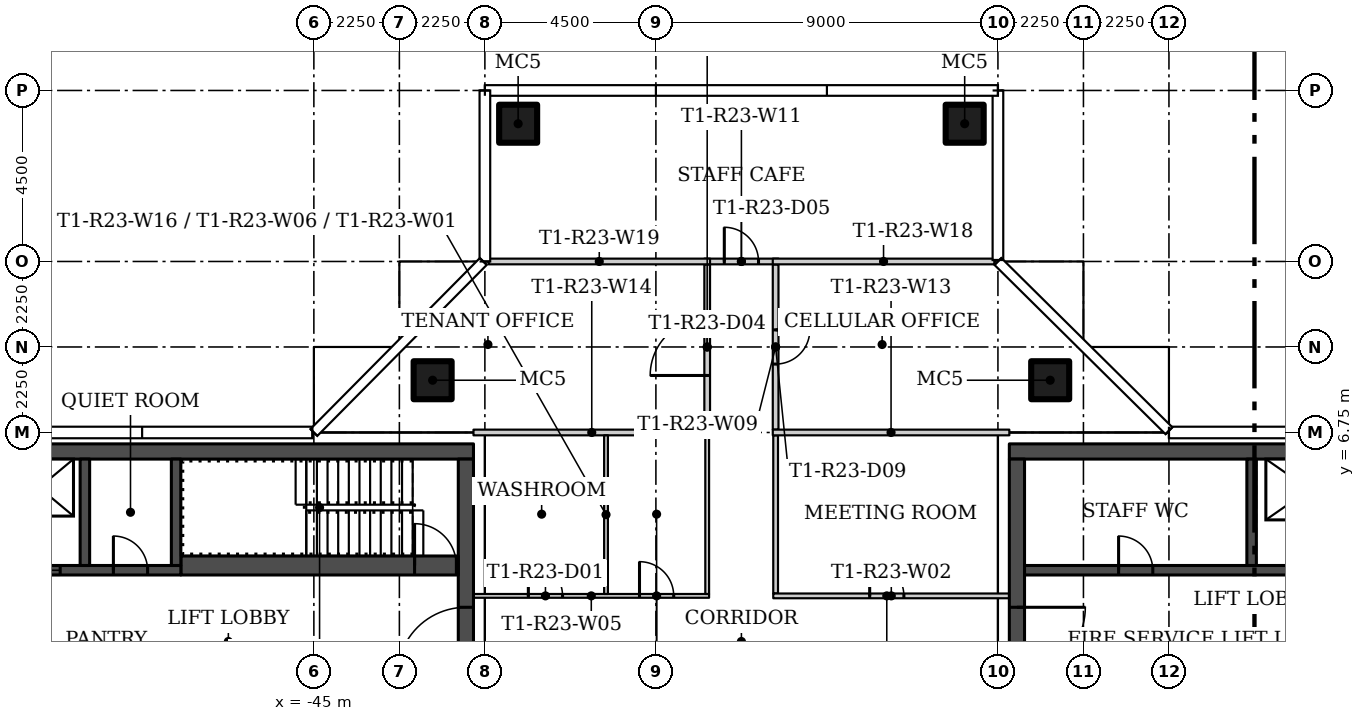
"""IFC4 building model, lengths in metres.
Left out: names, types, materials, properties, quantities, classifications, styles, units other than length and angle.
Written with IfcOpenShell. Run it as: python <this file> out.ifc"""

import sys

from ifc_helpers import new_model, si_unit, direction, frame, frame_2d, origin, origin_2d, place, context, subcontext, project, spatial, rectangle, hollow_rectangle, extrude, element, fill, save


model = new_model("IFC4")
c1 = context("Model", 3, precision=1e-05, world=origin(), true_north=direction((0.0, 1.0)))
c2 = subcontext(c1, "Body", "Model", "MODEL_VIEW")
j1 = project(units=[si_unit("LENGTHUNIT", "METRE"), si_unit("PLANEANGLEUNIT", "RADIAN")], contexts=[c1])
p1 = place(None, origin())
s1 = spatial("IfcSite", under=j1, at=p1, CompositionType="ELEMENT")
p2 = place(p1, origin())
s2 = spatial("IfcBuilding", under=s1, at=p2, CompositionType="ELEMENT")
p3 = place(p2, frame((0.0, 0.0, 210.0)))
s3 = spatial("IfcBuildingStorey", under=s2, at=p3, CompositionType="ELEMENT", Elevation=210.0)
for number, where in (
    (1, (-25.625, 8.125, 0.0)),
    (2, (-41.875, 8.125, 0.0)),
    (3, (-39.625, 14.875, 0.0)),
    (4, (-27.875, 14.875, 0.0)),
):
    element("IfcColumn", number, at=place(p3, frame(where)), inside=s3, PredefinedType="COLUMN", context=c2, shape_type="SweptSolid", body=[
        extrude(hollow_rectangle(XDim=1.0, YDim=1.0, WallThickness=0.04, at=origin_2d()), origin(), (0.0, 0.0, 1.0), 3.55),
    ])
p4 = place(p3, frame((-32.85, 6.675, 0.0), z_axis=(0.0, 0.0, 1.0), x_axis=(0.0, -1.0, 0.0)))
e5 = element("IfcWall", 5, at=p4, inside=s3, PredefinedType="PARTITIONING", context=c2, shape_type="SweptSolid", body=[
    extrude(rectangle(XDim=4.162, YDim=0.125, at=frame_2d((2.081, 0.0))), origin(), (0.0, 0.0, 1.0), 3.55),
])
p5 = place(p3, frame((-32.912, 2.45, 0.0)))
e6 = element("IfcWall", 6, at=p5, inside=s3, PredefinedType="PARTITIONING", context=c2, shape_type="SweptSolid", body=[
    extrude(rectangle(XDim=6.212, YDim=0.125, at=frame_2d((3.106, 0.0))), origin(), (0.0, 0.0, 1.0), 3.55),
])
p6 = place(p5, frame((2.537, 0.0, 0.0)))
e7 = element("IfcOpeningElement", 7, at=p6, cuts=e6, PredefinedType="OPENING", context=c2, shape_type="SweptSolid", body=[
    extrude(rectangle(XDim=0.9, YDim=2.1, at=frame_2d((0.45, 1.05))), frame((0.0, 0.073, 0.0), z_axis=(0.0, -1.0, 0.0), x_axis=(1.0, 0.0, 0.0)), (0.0, 0.0, 1.0), 0.145),
])
p7 = place(p3, frame((-40.8, 2.45, 0.0)))
e8 = element("IfcWall", 8, at=p7, inside=s3, PredefinedType="PARTITIONING", context=c2, shape_type="SweptSolid", body=[
    extrude(rectangle(XDim=6.2, YDim=0.1, at=frame_2d((3.1, 0.0))), origin(), (0.0, 0.0, 1.0), 3.55),
])
p8 = place(p7, frame((1.444, 0.0, 0.0)))
e9 = element("IfcOpeningElement", 9, at=p8, cuts=e8, PredefinedType="OPENING", context=c2, shape_type="SweptSolid", body=[
    extrude(rectangle(XDim=0.9, YDim=2.1, at=frame_2d((0.45, 1.05))), frame((0.0, 0.06, 0.0), z_axis=(0.0, -1.0, 0.0), x_axis=(1.0, 0.0, 0.0)), (0.0, 0.0, 1.0), 0.12),
])
p9 = place(p7, frame((4.368, 0.0, 0.0)))
e10 = element("IfcOpeningElement", 10, at=p9, cuts=e8, PredefinedType="OPENING", context=c2, shape_type="SweptSolid", body=[
    extrude(rectangle(XDim=0.9, YDim=2.1, at=frame_2d((0.45, 1.05))), frame((0.0, 0.06, 0.0), z_axis=(0.0, -1.0, 0.0), x_axis=(1.0, 0.0, 0.0)), (0.0, 0.0, 1.0), 0.12),
])
p10 = place(p3, frame((-34.65, 2.5, 0.0), z_axis=(0.0, 0.0, 1.0), x_axis=(0.0, 1.0, 0.0)))
e11 = element("IfcWall", 11, at=p10, inside=s3, PredefinedType="PARTITIONING", context=c2, shape_type="SweptSolid", body=[
    extrude(rectangle(XDim=4.175, YDim=0.1, at=frame_2d((2.087, 0.0))), origin(), (0.0, 0.0, 1.0), 3.55),
])
p11 = place(p3, frame((-32.85, 11.175, 0.0), z_axis=(0.0, 0.0, 1.0), x_axis=(0.0, -1.0, 0.0)))
e12 = element("IfcWall", 12, at=p11, inside=s3, PredefinedType="PARTITIONING", context=c2, shape_type="SweptSolid", body=[
    extrude(rectangle(XDim=4.35, YDim=0.15, at=frame_2d((2.175, 0.0))), origin(), (0.0, 0.0, 1.0), 3.55),
])
p12 = place(p11, frame((1.725, 0.0, 0.0)))
e13 = element("IfcOpeningElement", 13, at=p12, cuts=e12, PredefinedType="OPENING", context=c2, shape_type="SweptSolid", body=[
    extrude(rectangle(XDim=0.9, YDim=2.1, at=frame_2d((0.45, 1.05))), frame((0.0, 0.085, 0.0), z_axis=(0.0, -1.0, 0.0), x_axis=(1.0, 0.0, 0.0)), (0.0, 0.0, 1.0), 0.17),
])
p13 = place(p3, frame((-34.65, 6.825, 0.0), z_axis=(0.0, 0.0, 1.0), x_axis=(0.0, 1.0, 0.0)))
e14 = element("IfcWall", 14, at=p13, inside=s3, PredefinedType="PARTITIONING", context=c2, shape_type="SweptSolid", body=[
    extrude(rectangle(XDim=4.35, YDim=0.15, at=frame_2d((2.175, 0.0))), origin(), (0.0, 0.0, 1.0), 3.55),
])
p14 = place(p13, frame((1.425, 0.0, 0.0)))
e15 = element("IfcOpeningElement", 15, at=p14, cuts=e14, PredefinedType="OPENING", context=c2, shape_type="SweptSolid", body=[
    extrude(rectangle(XDim=1.5, YDim=2.1, at=frame_2d((0.75, 1.05))), frame((0.0, 0.085, 0.0), z_axis=(0.0, -1.0, 0.0), x_axis=(1.0, 0.0, 0.0)), (0.0, 0.0, 1.0), 0.17),
])
p15 = place(p3, frame((-34.725, 11.25, 0.0)))
e16 = element("IfcWall", 16, at=p15, inside=s3, PredefinedType="PARTITIONING", context=c2, shape_type="SweptSolid", body=[
    extrude(rectangle(XDim=1.951, YDim=0.15, at=frame_2d((0.975, 0.0))), origin(), (0.0, 0.0, 1.0), 3.55),
])
p16 = place(p15, frame((0.525, 0.0, 0.0)))
e17 = element("IfcOpeningElement", 17, at=p16, cuts=e16, PredefinedType="OPENING", context=c2, shape_type="SweptSolid", body=[
    extrude(rectangle(XDim=0.9, YDim=2.1, at=frame_2d((0.45, 1.05))), frame((0.0, 0.085, 0.0), z_axis=(0.0, -1.0, 0.0), x_axis=(1.0, 0.0, 0.0)), (0.0, 0.0, 1.0), 0.17),
])
for number, where, z_axis, x_axis in (
    (18, (-26.7, 6.75, 0.0), (0.0, 0.0, 1.0), (-1.0, 0.0, 0.0)),
    (19, (-34.575, 6.75, 0.0), (0.0, 0.0, 1.0), (-1.0, 0.0, 0.0)),
):
    element("IfcWall", number, at=place(p3, frame(where, z_axis=z_axis, x_axis=x_axis)), inside=s3, PredefinedType="PARTITIONING", context=c2, shape_type="SweptSolid", body=[
        extrude(rectangle(XDim=6.225, YDim=0.15, at=frame_2d((3.112, 0.0))), origin(), (0.0, 0.0, 1.0), 3.55),
    ])
p17 = place(p3, frame((-37.312, 2.5, 0.0), z_axis=(0.0, 0.0, 1.0), x_axis=(0.0, 1.0, 0.0)))
e20 = element("IfcWall", 20, at=p17, inside=s3, PredefinedType="PARTITIONING", context=c2, shape_type="SweptSolid", body=[
    extrude(rectangle(XDim=4.175, YDim=0.1, at=frame_2d((2.087, 0.0))), origin(), (0.0, 0.0, 1.0), 3.55),
])
for number, where, z_axis, x_axis in (
    (21, (-27.095, 11.25, 0.0), (0.0, 0.0, 1.0), (-1.0, 0.0, 0.0)),
    (22, (-34.575, 11.25, 0.0), (0.0, 0.0, 1.0), (-1.0, 0.0, 0.0)),
):
    element("IfcWall", number, at=place(p3, frame(where, z_axis=z_axis, x_axis=x_axis)), inside=s3, PredefinedType="PARTITIONING", context=c2, shape_type="SweptSolid", body=[
        extrude(rectangle(XDim=5.83, YDim=0.15, at=frame_2d((2.915, 0.0))), origin(), (0.0, 0.0, 1.0), 3.55),
    ])
p18 = place(p3, frame((-26.7, 6.25, 0.0)))
e23 = element("IfcWall", 23, at=p18, inside=s3, PredefinedType="SHEAR", context=c2, shape_type="SweptSolid", body=[
    extrude(rectangle(XDim=12.9, YDim=0.4, at=frame_2d((6.45, 0.0))), origin(), (0.0, 0.0, 1.0), 3.55),
])
p19 = place(p3, frame((-26.5, 6.05, 0.0), z_axis=(0.0, 0.0, 1.0), x_axis=(0.0, -1.0, 0.0)))
e24 = element("IfcWall", 24, at=p19, inside=s3, PredefinedType="SHEAR", context=c2, shape_type="SweptSolid", body=[
    extrude(rectangle(XDim=12.1, YDim=0.4, at=frame_2d((6.05, 0.0))), origin(), (0.0, 0.0, 1.0), 3.55),
])
p20 = place(p19, frame((3.9, 0.0, 0.0)))
e25 = element("IfcOpeningElement", 25, at=p20, cuts=e24, PredefinedType="OPENING", context=c2, shape_type="SweptSolid", body=[
    extrude(rectangle(XDim=1.8, YDim=2.4, at=frame_2d((0.9, 1.2))), frame((0.0, 0.21, 0.0), z_axis=(0.0, -1.0, 0.0), x_axis=(1.0, 0.0, 0.0)), (0.0, 0.0, 1.0), 0.42),
])
p21 = place(p3, frame((-26.3, 3.125, 0.0)))
e26 = element("IfcWall", 26, at=p21, inside=s3, PredefinedType="SHEAR", context=c2, shape_type="SweptSolid", body=[
    extrude(rectangle(XDim=12.1, YDim=0.25, at=frame_2d((6.05, 0.0))), origin(), (0.0, 0.0, 1.0), 3.55),
])
p22 = place(p21, frame((6.95, 0.0, 0.0)))
e27 = element("IfcOpeningElement", 27, at=p22, cuts=e26, PredefinedType="OPENING", context=c2, shape_type="SweptSolid", body=[
    extrude(rectangle(XDim=1.1, YDim=2.1, at=frame_2d((0.55, 1.05))), frame((0.0, 0.135, 0.0), z_axis=(0.0, -1.0, 0.0), x_axis=(1.0, 0.0, 0.0)), (0.0, 0.0, 1.0), 0.27),
])
p23 = place(p21, frame((10.075, 0.0, 0.0)))
e28 = element("IfcOpeningElement", 28, at=p23, cuts=e26, PredefinedType="OPENING", context=c2, shape_type="SweptSolid", body=[
    extrude(rectangle(XDim=1.1, YDim=2.1, at=frame_2d((0.55, 1.05))), frame((0.0, 0.135, 0.0), z_axis=(0.0, -1.0, 0.0), x_axis=(1.0, 0.0, 0.0)), (0.0, 0.0, 1.0), 0.27),
])
p24 = place(p21, frame((2.475, 0.0, 0.0)))
e29 = element("IfcOpeningElement", 29, at=p24, cuts=e26, PredefinedType="OPENING", context=c2, shape_type="SweptSolid", body=[
    extrude(rectangle(XDim=0.9, YDim=2.1, at=frame_2d((0.45, 1.05))), frame((0.0, 0.135, 0.0), z_axis=(0.0, -1.0, 0.0), x_axis=(1.0, 0.0, 0.0)), (0.0, 0.0, 1.0), 0.27),
])
p25 = place(p3, frame((-20.325, 3.25, 0.0), z_axis=(0.0, 0.0, 1.0), x_axis=(0.0, 1.0, 0.0)))
e30 = element("IfcWall", 30, at=p25, inside=s3, PredefinedType="SHEAR", context=c2, shape_type="SweptSolid", body=[
    extrude(rectangle(XDim=2.8, YDim=0.25, at=frame_2d((1.4, 0.0))), origin(), (0.0, 0.0, 1.0), 3.55),
])
p26 = place(p3, frame((-40.8, 6.25, 0.0), z_axis=(0.0, 0.0, 1.0), x_axis=(-1.0, 0.0, 0.0)))
e31 = element("IfcWall", 31, at=p26, inside=s3, PredefinedType="SHEAR", context=c2, shape_type="SweptSolid", body=[
    extrude(rectangle(XDim=12.9, YDim=0.4, at=frame_2d((6.45, 0.0))), origin(), (0.0, 0.0, 1.0), 3.55),
])
p27 = place(p3, frame((-41.0, -6.05, 0.0), z_axis=(0.0, 0.0, 1.0), x_axis=(0.0, 1.0, 0.0)))
e32 = element("IfcWall", 32, at=p27, inside=s3, PredefinedType="SHEAR", context=c2, shape_type="SweptSolid", body=[
    extrude(rectangle(XDim=12.1, YDim=0.4, at=frame_2d((6.05, 0.0))), origin(), (0.0, 0.0, 1.0), 3.55),
])
p28 = place(p27, frame((6.4, 0.0, 0.0)))
e33 = element("IfcOpeningElement", 33, at=p28, cuts=e32, PredefinedType="OPENING", context=c2, shape_type="SweptSolid", body=[
    extrude(rectangle(XDim=1.8, YDim=2.4, at=frame_2d((0.9, 1.2))), frame((0.0, 0.21, 0.0), z_axis=(0.0, -1.0, 0.0), x_axis=(1.0, 0.0, 0.0)), (0.0, 0.0, 1.0), 0.42),
])
p29 = place(p3, frame((-48.5, 3.25, 0.0)))
e34 = element("IfcWall", 34, at=p29, inside=s3, PredefinedType="SHEAR", context=c2, shape_type="SweptSolid", body=[
    extrude(rectangle(XDim=7.3, YDim=0.5, at=frame_2d((3.65, 0.0))), origin(), (0.0, 0.0, 1.0), 3.55),
])
p30 = place(p29, frame((6.15, 0.0, 0.0)))
e35 = element("IfcOpeningElement", 35, at=p30, cuts=e34, PredefinedType="OPENING", context=c2, shape_type="SweptSolid", body=[
    extrude(rectangle(XDim=1.1, YDim=2.1, at=frame_2d((0.55, 1.05))), frame((0.0, 0.26, 0.0), z_axis=(0.0, -1.0, 0.0), x_axis=(1.0, 0.0, 0.0)), (0.0, 0.0, 1.0), 0.52),
])
p31 = place(p3, frame((-53.3, 3.125, 0.0)))
e36 = element("IfcWall", 36, at=p31, inside=s3, PredefinedType="SHEAR", context=c2, shape_type="SweptSolid", body=[
    extrude(rectangle(XDim=4.8, YDim=0.25, at=frame_2d((2.4, 0.0))), origin(), (0.0, 0.0, 1.0), 3.55),
])
p32 = place(p31, frame((0.525, 0.0, 0.0)))
e37 = element("IfcOpeningElement", 37, at=p32, cuts=e36, PredefinedType="OPENING", context=c2, shape_type="SweptSolid", body=[
    extrude(rectangle(XDim=1.1, YDim=2.1, at=frame_2d((0.55, 1.05))), frame((0.0, 0.135, 0.0), z_axis=(0.0, -1.0, 0.0), x_axis=(1.0, 0.0, 0.0)), (0.0, 0.0, 1.0), 0.27),
])
p33 = place(p31, frame((3.025, 0.0, 0.0)))
e38 = element("IfcOpeningElement", 38, at=p33, cuts=e36, PredefinedType="OPENING", context=c2, shape_type="SweptSolid", body=[
    extrude(rectangle(XDim=0.9, YDim=2.1, at=frame_2d((0.45, 1.05))), frame((0.0, 0.135, 0.0), z_axis=(0.0, -1.0, 0.0), x_axis=(1.0, 0.0, 0.0)), (0.0, 0.0, 1.0), 0.27),
])
for number, where, z_axis, x_axis in (
    (39, (-48.625, 3.25, 0.0), (0.0, 0.0, 1.0), (0.0, 1.0, 0.0)),
    (40, (-51.025, 3.25, 0.0), (0.0, 0.0, 1.0), (0.0, 1.0, 0.0)),
):
    element("IfcWall", number, at=place(p3, frame(where, z_axis=z_axis, x_axis=x_axis)), inside=s3, PredefinedType="SHEAR", context=c2, shape_type="SweptSolid", body=[
        extrude(rectangle(XDim=2.8, YDim=0.25, at=frame_2d((1.4, 0.0))), origin(), (0.0, 0.0, 1.0), 3.55),
    ])
p34 = place(p8, origin())
e41 = element("IfcDoor", 41, at=p34, inside=s3, OperationType="SINGLE_SWING_LEFT", PredefinedType="DOOR", context=c2, shape_type="SweptSolid", body=[
    extrude(rectangle(XDim=0.9, YDim=2.1, at=frame_2d((0.45, 1.05))), frame((0.0, 0.025, 0.0), z_axis=(0.0, -1.0, 0.0), x_axis=(1.0, 0.0, 0.0)), (0.0, 0.0, 1.0), 0.05),
])
fill(e9, e41)
p35 = place(p9, origin())
e42 = element("IfcDoor", 42, at=p35, inside=s3, OperationType="SINGLE_SWING_RIGHT", PredefinedType="DOOR", context=c2, shape_type="SweptSolid", body=[
    extrude(rectangle(XDim=0.9, YDim=2.1, at=frame_2d((0.45, 1.05))), frame((0.0, 0.025, 0.0), z_axis=(0.0, -1.0, 0.0), x_axis=(1.0, 0.0, 0.0)), (0.0, 0.0, 1.0), 0.05),
])
fill(e10, e42)
p36 = place(p14, origin())
e43 = element("IfcDoor", 43, at=p36, inside=s3, OperationType="DOUBLE_DOOR_SINGLE_SWING", PredefinedType="DOOR", context=c2, shape_type="SweptSolid", body=[
    extrude(rectangle(XDim=1.5, YDim=2.1, at=frame_2d((0.75, 1.05))), frame((0.0, 0.025, 0.0), z_axis=(0.0, -1.0, 0.0), x_axis=(1.0, 0.0, 0.0)), (0.0, 0.0, 1.0), 0.05),
])
fill(e15, e43)
p37 = place(p16, origin())
e44 = element("IfcDoor", 44, at=p37, inside=s3, OperationType="SINGLE_SWING_LEFT", PredefinedType="DOOR", context=c2, shape_type="SweptSolid", body=[
    extrude(rectangle(XDim=0.9, YDim=2.1, at=frame_2d((0.45, 1.05))), frame((0.0, 0.025, 0.0), z_axis=(0.0, -1.0, 0.0), x_axis=(1.0, 0.0, 0.0)), (0.0, 0.0, 1.0), 0.05),
])
fill(e17, e44)
p38 = place(p6, origin())
e45 = element("IfcDoor", 45, at=p38, inside=s3, OperationType="SINGLE_SWING_RIGHT", PredefinedType="DOOR", context=c2, shape_type="SweptSolid", body=[
    extrude(rectangle(XDim=0.9, YDim=2.1, at=frame_2d((0.45, 1.05))), frame((0.0, 0.025, 0.0), z_axis=(0.0, -1.0, 0.0), x_axis=(1.0, 0.0, 0.0)), (0.0, 0.0, 1.0), 0.05),
])
fill(e7, e45)
p39 = place(p12, origin())
e46 = element("IfcDoor", 46, at=p39, inside=s3, OperationType="SINGLE_SWING_LEFT", PredefinedType="DOOR", context=c2, shape_type="SweptSolid", body=[
    extrude(rectangle(XDim=0.9, YDim=2.1, at=frame_2d((0.45, 1.05))), frame((0.0, 0.025, 0.0), z_axis=(0.0, -1.0, 0.0), x_axis=(1.0, 0.0, 0.0)), (0.0, 0.0, 1.0), 0.05),
])
fill(e13, e46)
p40 = place(p20, origin())
e47 = element("IfcDoor", 47, at=p40, inside=s3, OperationType="DOUBLE_DOOR_SINGLE_SWING", PredefinedType="DOOR", context=c2, shape_type="SweptSolid", body=[
    extrude(rectangle(XDim=1.8, YDim=2.4, at=frame_2d((0.9, 1.2))), frame((0.0, 0.025, 0.0), z_axis=(0.0, -1.0, 0.0), x_axis=(1.0, 0.0, 0.0)), (0.0, 0.0, 1.0), 0.05),
])
fill(e25, e47)
p41 = place(p24, origin())
e48 = element("IfcDoor", 48, at=p41, inside=s3, OperationType="SINGLE_SWING_LEFT", PredefinedType="DOOR", context=c2, shape_type="SweptSolid", body=[
    extrude(rectangle(XDim=0.9, YDim=2.1, at=frame_2d((0.45, 1.05))), frame((0.0, 0.025, 0.0), z_axis=(0.0, -1.0, 0.0), x_axis=(1.0, 0.0, 0.0)), (0.0, 0.0, 1.0), 0.05),
])
fill(e29, e48)
p42 = place(p28, origin())
e49 = element("IfcDoor", 49, at=p42, inside=s3, OperationType="DOUBLE_DOOR_SINGLE_SWING", PredefinedType="DOOR", context=c2, shape_type="SweptSolid", body=[
    extrude(rectangle(XDim=1.8, YDim=2.4, at=frame_2d((0.9, 1.2))), frame((0.0, 0.025, 0.0), z_axis=(0.0, -1.0, 0.0), x_axis=(1.0, 0.0, 0.0)), (0.0, 0.0, 1.0), 0.05),
])
fill(e33, e49)
p43 = place(p30, origin())
e50 = element("IfcDoor", 50, at=p43, inside=s3, OperationType="SINGLE_SWING_RIGHT", PredefinedType="DOOR", context=c2, shape_type="SweptSolid", body=[
    extrude(rectangle(XDim=1.1, YDim=2.1, at=frame_2d((0.55, 1.05))), frame((0.0, 0.025, 0.0), z_axis=(0.0, -1.0, 0.0), x_axis=(1.0, 0.0, 0.0)), (0.0, 0.0, 1.0), 0.05),
])
fill(e35, e50)
p44 = place(p32, origin())
e51 = element("IfcDoor", 51, at=p44, inside=s3, OperationType="SLIDING_TO_LEFT", PredefinedType="DOOR", context=c2, shape_type="SweptSolid", body=[
    extrude(rectangle(XDim=1.1, YDim=2.1, at=frame_2d((0.55, 1.05))), frame((0.0, 0.025, 0.0), z_axis=(0.0, -1.0, 0.0), x_axis=(1.0, 0.0, 0.0)), (0.0, 0.0, 1.0), 0.05),
])
fill(e37, e51)
p45 = place(p33, origin())
e52 = element("IfcDoor", 52, at=p45, inside=s3, OperationType="SINGLE_SWING_RIGHT", PredefinedType="DOOR", context=c2, shape_type="SweptSolid", body=[
    extrude(rectangle(XDim=0.9, YDim=2.1, at=frame_2d((0.45, 1.05))), frame((0.0, 0.025, 0.0), z_axis=(0.0, -1.0, 0.0), x_axis=(1.0, 0.0, 0.0)), (0.0, 0.0, 1.0), 0.05),
])
fill(e38, e52)
save(model, sys.argv[1])
